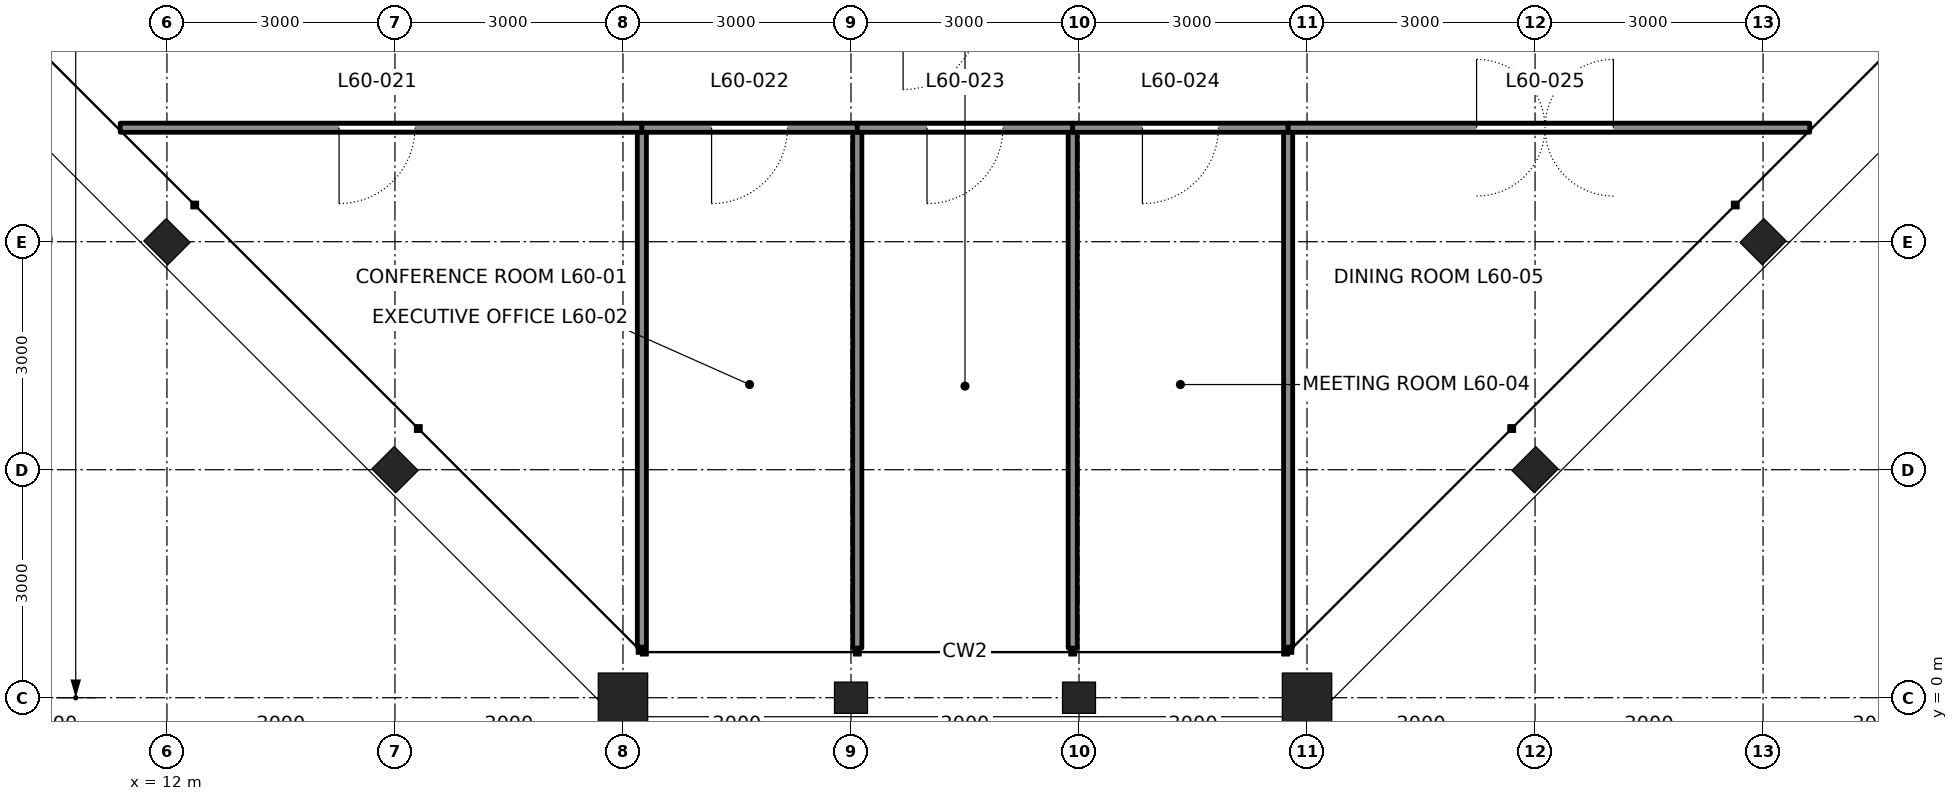
"""IFC4 building model, lengths in metres.
Left out: names, types, materials, properties, quantities, classifications, styles, units other than length and angle.
Written with IfcOpenShell. Run it as: python <this file> out.ifc"""

import sys

from ifc_helpers import new_model, si_unit, direction, frame, frame_2d, origin, origin_2d, place, context, subcontext, project, spatial, rectangle, hollow_rectangle, i_section, extrude, element, fill, save


model = new_model("IFC4")
c1 = context("Model", 3, precision=1e-05, world=origin(), true_north=direction((0.0, 1.0)))
c2 = subcontext(c1, "Body", "Model", "MODEL_VIEW")
j1 = project(units=[si_unit("LENGTHUNIT", "METRE"), si_unit("PLANEANGLEUNIT", "RADIAN")], contexts=[c1])
p1 = place(None, origin())
s1 = spatial("IfcSite", under=j1, at=p1, CompositionType="ELEMENT")
p2 = place(p1, origin())
s2 = spatial("IfcBuilding", under=s1, at=p2, CompositionType="ELEMENT")
p3 = place(p2, frame((0.0, 0.0, 270.6)))
s3 = spatial("IfcBuildingStorey", under=s2, at=p3, CompositionType="ELEMENT", Elevation=270.6)
p4 = place(p3, frame((18.0, 0.0, 0.0), z_axis=(0.0, 0.0, 1.0), x_axis=(0.0, -1.0, 0.0)))
e1 = element("IfcColumn", 1, at=p4, inside=s3, PredefinedType="COLUMN", context=c2, shape_type="SweptSolid", body=[
    extrude(hollow_rectangle(XDim=0.65, YDim=0.65, WallThickness=0.065, at=origin_2d()), origin(), (0.0, 0.0, 1.0), 4.2),
])
for number, where, z_axis, x_axis in (
    (2, (21.0, 0.0, 0.0), (0.0, 0.0, 1.0), (0.0, -1.0, 0.0)),
    (3, (24.0, 0.0, 0.0), (0.0, 0.0, 1.0), (0.0, -1.0, 0.0)),
):
    element("IfcColumn", number, at=place(p3, frame(where, z_axis=z_axis, x_axis=x_axis)), inside=s3, PredefinedType="COLUMN", context=c2, shape_type="SweptSolid", body=[
        extrude(i_section(OverallWidth=0.411, OverallDepth=0.434, WebThickness=0.036, FlangeThickness=0.057, at=origin_2d()), origin(), (0.0, 0.0, 1.0), 4.2),
    ])
p5 = place(p3, frame((27.0, 0.0, 0.0), z_axis=(0.0, 0.0, 1.0), x_axis=(0.0, -1.0, 0.0)))
e4 = element("IfcColumn", 4, at=p5, inside=s3, PredefinedType="COLUMN", context=c2, shape_type="SweptSolid", body=[
    extrude(hollow_rectangle(XDim=0.65, YDim=0.65, WallThickness=0.065, at=origin_2d()), origin(), (0.0, 0.0, 1.0), 4.2),
])
for number, where, z_axis, x_axis in (
    (5, (30.0, 3.0, 0.0), (0.0, 0.0, 1.0), (0.707, -0.707, 0.0)),
    (6, (33.0, 6.0, 0.0), (0.0, 0.0, 1.0), (0.707, -0.707, 0.0)),
    (7, (12.0, 6.0, 0.0), (0.0, 0.0, 1.0), (-0.707, -0.707, 0.0)),
    (8, (15.0, 3.0, 0.0), (0.0, 0.0, 1.0), (-0.707, -0.707, 0.0)),
):
    element("IfcColumn", number, at=place(p3, frame(where, z_axis=z_axis, x_axis=x_axis)), inside=s3, PredefinedType="COLUMN", context=c2, shape_type="SweptSolid", body=[
        extrude(i_section(OverallWidth=0.417, OverallDepth=0.445, WebThickness=0.039, FlangeThickness=0.063, at=origin_2d()), origin(), (0.0, 0.0, 1.0), 4.2),
    ])
p6 = place(p3, frame((18.249, 0.666, 0.0), z_axis=(0.0, 0.0, 1.0), x_axis=(0.0, 1.0, 0.0)))
e9 = element("IfcWall", 9, at=p6, inside=s3, PredefinedType="PARTITIONING", context=c2, shape_type="SweptSolid", body=[
    extrude(rectangle(XDim=6.834, YDim=0.12, at=frame_2d((3.417, 0.0))), origin(), (0.0, 0.0, 1.0), 4.04),
])
for number, where, z_axis, x_axis in (
    (10, (21.083, 0.653, 0.0), (0.0, 0.0, 1.0), (0.0, 1.0, 0.0)),
    (11, (23.917, 0.653, 0.0), (0.0, 0.0, 1.0), (0.0, 1.0, 0.0)),
):
    element("IfcWall", number, at=place(p3, frame(where, z_axis=z_axis, x_axis=x_axis)), inside=s3, PredefinedType="PARTITIONING", context=c2, shape_type="SweptSolid", body=[
        extrude(rectangle(XDim=6.847, YDim=0.12, at=frame_2d((3.424, 0.0))), origin(), (0.0, 0.0, 1.0), 3.357),
    ])
p7 = place(p3, frame((26.751, 0.666, 0.0), z_axis=(0.0, 0.0, 1.0), x_axis=(0.0, 1.0, 0.0)))
e12 = element("IfcWall", 12, at=p7, inside=s3, PredefinedType="PARTITIONING", context=c2, shape_type="SweptSolid", body=[
    extrude(rectangle(XDim=6.834, YDim=0.12, at=frame_2d((3.417, 0.0))), origin(), (0.0, 0.0, 1.0), 4.04),
])
p8 = place(p3, frame((11.385, 7.5, 0.0), z_axis=(0.0, 0.0, 1.0), x_axis=(1.0, 0.0, 0.0)))
e13 = element("IfcWall", 13, at=p8, inside=s3, PredefinedType="PARTITIONING", context=c2, shape_type="SweptSolid", body=[
    extrude(rectangle(XDim=6.863, YDim=0.12, at=frame_2d((3.432, 0.0))), origin(), (0.0, 0.0, 1.0), 4.04),
])
p9 = place(p8, frame((2.879, 0.0, 0.0)))
e14 = element("IfcOpeningElement", 14, at=p9, cuts=e13, PredefinedType="OPENING", context=c2, shape_type="SweptSolid", body=[
    extrude(rectangle(XDim=1.0, YDim=2.4, at=frame_2d((0.5, 1.2))), frame((0.0, 0.07, 0.0), z_axis=(0.0, -1.0, 0.0), x_axis=(1.0, 0.0, 0.0)), (0.0, 0.0, 1.0), 0.14),
])
p10 = place(p3, frame((18.249, 7.5, 0.0), z_axis=(0.0, 0.0, 1.0), x_axis=(1.0, 0.0, 0.0)))
e15 = element("IfcWall", 15, at=p10, inside=s3, PredefinedType="PARTITIONING", context=c2, shape_type="SweptSolid", body=[
    extrude(rectangle(XDim=2.834, YDim=0.12, at=frame_2d((1.417, 0.0))), origin(), (0.0, 0.0, 1.0), 4.04),
])
p11 = place(p10, frame((0.917, 0.0, 0.0)))
e16 = element("IfcOpeningElement", 16, at=p11, cuts=e15, PredefinedType="OPENING", context=c2, shape_type="SweptSolid", body=[
    extrude(rectangle(XDim=1.0, YDim=2.4, at=frame_2d((0.5, 1.2))), frame((0.0, 0.07, 0.0), z_axis=(0.0, -1.0, 0.0), x_axis=(1.0, 0.0, 0.0)), (0.0, 0.0, 1.0), 0.14),
])
p12 = place(p3, frame((21.083, 7.5, 0.0), z_axis=(0.0, 0.0, 1.0), x_axis=(1.0, 0.0, 0.0)))
e17 = element("IfcWall", 17, at=p12, inside=s3, PredefinedType="PARTITIONING", context=c2, shape_type="SweptSolid", body=[
    extrude(rectangle(XDim=2.834, YDim=0.12, at=frame_2d((1.417, 0.0))), origin(), (0.0, 0.0, 1.0), 4.04),
])
p13 = place(p12, frame((0.917, 0.0, 0.0)))
e18 = element("IfcOpeningElement", 18, at=p13, cuts=e17, PredefinedType="OPENING", context=c2, shape_type="SweptSolid", body=[
    extrude(rectangle(XDim=1.0, YDim=2.4, at=frame_2d((0.5, 1.2))), frame((0.0, 0.07, 0.0), z_axis=(0.0, -1.0, 0.0), x_axis=(1.0, 0.0, 0.0)), (0.0, 0.0, 1.0), 0.14),
])
p14 = place(p3, frame((23.917, 7.5, 0.0), z_axis=(0.0, 0.0, 1.0), x_axis=(1.0, 0.0, 0.0)))
e19 = element("IfcWall", 19, at=p14, inside=s3, PredefinedType="PARTITIONING", context=c2, shape_type="SweptSolid", body=[
    extrude(rectangle(XDim=2.834, YDim=0.12, at=frame_2d((1.417, 0.0))), origin(), (0.0, 0.0, 1.0), 4.04),
])
p15 = place(p14, frame((0.917, 0.0, 0.0)))
e20 = element("IfcOpeningElement", 20, at=p15, cuts=e19, PredefinedType="OPENING", context=c2, shape_type="SweptSolid", body=[
    extrude(rectangle(XDim=1.0, YDim=2.4, at=frame_2d((0.5, 1.2))), frame((0.0, 0.07, 0.0), z_axis=(0.0, -1.0, 0.0), x_axis=(1.0, 0.0, 0.0)), (0.0, 0.0, 1.0), 0.14),
])
p16 = place(p3, frame((26.751, 7.5, 0.0), z_axis=(0.0, 0.0, 1.0), x_axis=(1.0, 0.0, 0.0)))
e21 = element("IfcWall", 21, at=p16, inside=s3, PredefinedType="PARTITIONING", context=c2, shape_type="SweptSolid", body=[
    extrude(rectangle(XDim=6.863, YDim=0.12, at=frame_2d((3.432, 0.0))), origin(), (0.0, 0.0, 1.0), 4.04),
])
p17 = place(p16, frame((2.479, 0.0, 0.0)))
e22 = element("IfcOpeningElement", 22, at=p17, cuts=e21, PredefinedType="OPENING", context=c2, shape_type="SweptSolid", body=[
    extrude(rectangle(XDim=1.8, YDim=2.4, at=frame_2d((0.9, 1.2))), frame((0.0, 0.07, 0.0), z_axis=(0.0, -1.0, 0.0), x_axis=(1.0, 0.0, 0.0)), (0.0, 0.0, 1.0), 0.14),
])
p18 = place(p9, frame((1.0, 0.0, 0.0), z_axis=(0.0, 0.0, 1.0), x_axis=(-1.0, 0.0, 0.0)))
e23 = element("IfcDoor", 23, at=p18, inside=s3, OperationType="SINGLE_SWING_RIGHT", PredefinedType="DOOR", context=c2, shape_type="SweptSolid", body=[
    extrude(rectangle(XDim=1.0, YDim=2.4, at=frame_2d((0.5, 1.2))), frame((0.0, 0.025, 0.0), z_axis=(0.0, -1.0, 0.0), x_axis=(1.0, 0.0, 0.0)), (0.0, 0.0, 1.0), 0.05),
])
fill(e14, e23)
p19 = place(p11, frame((1.0, 0.0, 0.0), z_axis=(0.0, 0.0, 1.0), x_axis=(-1.0, 0.0, 0.0)))
e24 = element("IfcDoor", 24, at=p19, inside=s3, OperationType="SINGLE_SWING_RIGHT", PredefinedType="DOOR", context=c2, shape_type="SweptSolid", body=[
    extrude(rectangle(XDim=1.0, YDim=2.4, at=frame_2d((0.5, 1.2))), frame((0.0, 0.025, 0.0), z_axis=(0.0, -1.0, 0.0), x_axis=(1.0, 0.0, 0.0)), (0.0, 0.0, 1.0), 0.05),
])
fill(e16, e24)
p20 = place(p13, frame((1.0, 0.0, 0.0), z_axis=(0.0, 0.0, 1.0), x_axis=(-1.0, 0.0, 0.0)))
e25 = element("IfcDoor", 25, at=p20, inside=s3, OperationType="SINGLE_SWING_RIGHT", PredefinedType="DOOR", context=c2, shape_type="SweptSolid", body=[
    extrude(rectangle(XDim=1.0, YDim=2.4, at=frame_2d((0.5, 1.2))), frame((0.0, 0.025, 0.0), z_axis=(0.0, -1.0, 0.0), x_axis=(1.0, 0.0, 0.0)), (0.0, 0.0, 1.0), 0.05),
])
fill(e18, e25)
p21 = place(p15, frame((1.0, 0.0, 0.0), z_axis=(0.0, 0.0, 1.0), x_axis=(-1.0, 0.0, 0.0)))
e26 = element("IfcDoor", 26, at=p21, inside=s3, OperationType="SINGLE_SWING_RIGHT", PredefinedType="DOOR", context=c2, shape_type="SweptSolid", body=[
    extrude(rectangle(XDim=1.0, YDim=2.4, at=frame_2d((0.5, 1.2))), frame((0.0, 0.025, 0.0), z_axis=(0.0, -1.0, 0.0), x_axis=(1.0, 0.0, 0.0)), (0.0, 0.0, 1.0), 0.05),
])
fill(e20, e26)
p22 = place(p17, origin())
e27 = element("IfcDoor", 27, at=p22, inside=s3, OperationType="DOUBLE_DOOR_DOUBLE_SWING", PredefinedType="DOOR", context=c2, shape_type="SweptSolid", body=[
    extrude(rectangle(XDim=1.8, YDim=2.4, at=frame_2d((0.9, 1.2))), frame((0.0, 0.025, 0.0), z_axis=(0.0, -1.0, 0.0), x_axis=(1.0, 0.0, 0.0)), (0.0, 0.0, 1.0), 0.05),
])
fill(e22, e27)
save(model, sys.argv[1])
